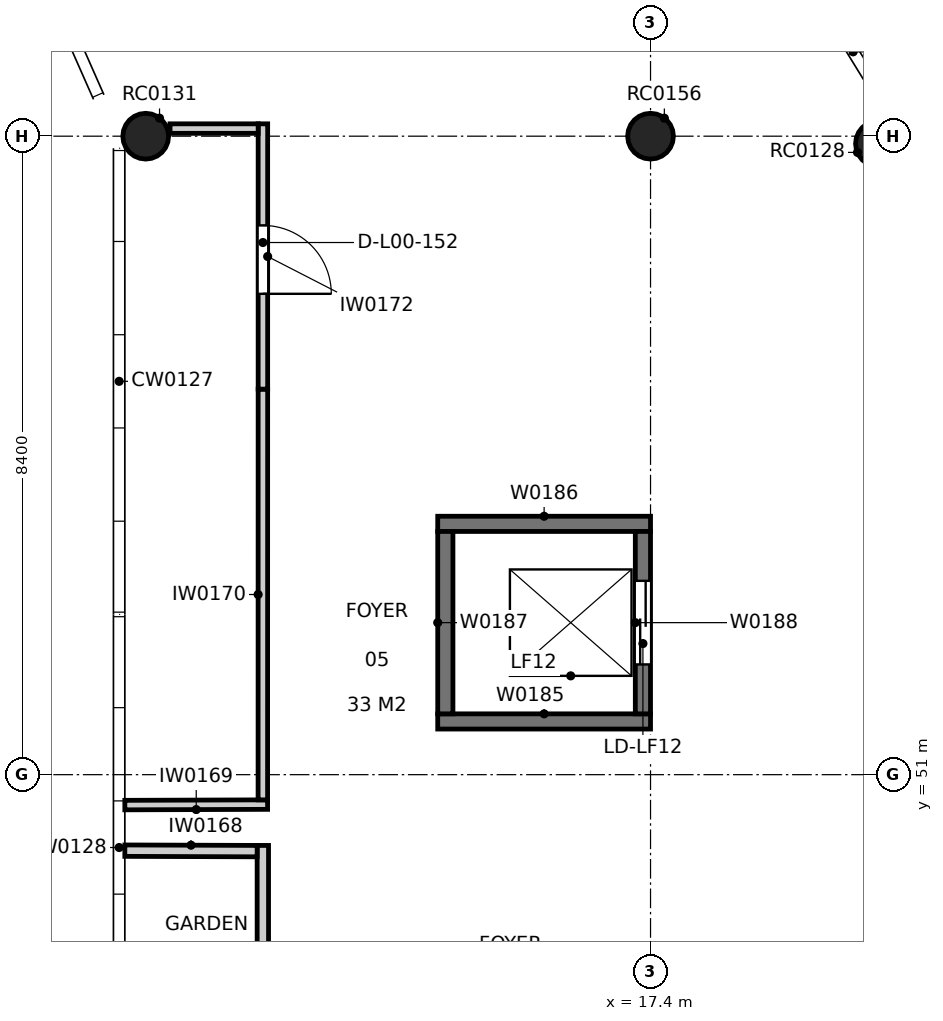
"""IFC4 building model, lengths in metres.
Left out: names, types, materials, properties, quantities, classifications, styles, units other than length and angle.
Written with IfcOpenShell. Run it as: python <this file> out.ifc"""

import sys

from ifc_helpers import new_model, si_unit, direction, frame, frame_2d, origin, origin_2d, place, context, subcontext, project, spatial, rectangle, circle, extrude, element, fill, save


model = new_model("IFC4")
c1 = context("Model", 3, precision=1e-05, world=origin(), true_north=direction((0.0, 1.0)))
c2 = subcontext(c1, "Body", "Model", "MODEL_VIEW")
j1 = project(units=[si_unit("LENGTHUNIT", "METRE"), si_unit("PLANEANGLEUNIT", "RADIAN")], contexts=[c1])
p1 = place(None, origin())
s1 = spatial("IfcSite", under=j1, at=p1, CompositionType="ELEMENT")
p2 = place(p1, origin())
s2 = spatial("IfcBuilding", under=s1, at=p2, CompositionType="ELEMENT")
p3 = place(p2, origin())
s3 = spatial("IfcBuildingStorey", under=s2, at=p3, CompositionType="ELEMENT", Elevation=0.0)
for number, where, z_axis, x_axis in (
    (1, (20.399, 59.301, -0.4), (0.0, 0.0, 1.0), (1.0, 0.0, 0.0)),
    (2, (10.758, 59.4, -0.4), (0.0, 0.0, 1.0), (1.0, 0.0, 0.0)),
    (3, (17.4, 59.4, -0.4), (0.0, 0.0, 1.0), (1.0, 0.0, 0.0)),
):
    element("IfcColumn", number, at=place(p3, frame(where, z_axis=z_axis, x_axis=x_axis)), inside=s3, PredefinedType="COLUMN", context=c2, shape_type="SweptSolid", body=[
        extrude(circle(Radius=0.3, at=origin_2d()), origin(), (0.0, 0.0, 1.0), 5.2),
    ])
for number, where, z_axis, x_axis in (
    (4, (14.6, 51.7, -1.4), (0.0, 0.0, 1.0), (1.0, 0.0, 0.0)),
    (5, (14.6, 54.3, -1.4), (0.0, 0.0, 1.0), (1.0, 0.0, 0.0)),
):
    element("IfcWall", number, at=place(p3, frame(where, z_axis=z_axis, x_axis=x_axis)), inside=s3, PredefinedType="SOLIDWALL", context=c2, shape_type="SweptSolid", body=[
        extrude(rectangle(XDim=2.8, YDim=0.2, at=frame_2d((1.4, 0.0))), origin(), (0.0, 0.0, 1.0), 6.2),
    ])
p4 = place(p3, frame((14.7, 51.8, -1.4), z_axis=(0.0, 0.0, 1.0), x_axis=(0.0, 1.0, 0.0)))
e6 = element("IfcWall", 6, at=p4, inside=s3, PredefinedType="SOLIDWALL", context=c2, shape_type="SweptSolid", body=[
    extrude(rectangle(XDim=2.4, YDim=0.2, at=frame_2d((1.2, 0.0))), origin(), (0.0, 0.0, 1.0), 6.2),
])
p5 = place(p3, frame((17.3, 51.8, -1.4), z_axis=(0.0, 0.0, 1.0), x_axis=(0.0, 1.0, 0.0)))
e7 = element("IfcWall", 7, at=p5, inside=s3, PredefinedType="SOLIDWALL", context=c2, shape_type="SweptSolid", body=[
    extrude(rectangle(XDim=2.4, YDim=0.2, at=frame_2d((1.2, 0.0))), origin(), (0.0, 0.0, 1.0), 6.2),
])
p6 = place(p5, frame((0.65, 0.0, 1.4)))
e8 = element("IfcOpeningElement", 8, at=p6, cuts=e7, PredefinedType="OPENING", context=c2, shape_type="SweptSolid", body=[
    extrude(rectangle(XDim=1.1, YDim=2.1, at=frame_2d((0.55, 1.05))), frame((0.0, 0.11, 0.0), z_axis=(0.0, -1.0, 0.0), x_axis=(1.0, 0.0, 0.0)), (0.0, 0.0, 1.0), 0.22),
])
p7 = place(p3, frame((12.3, 44.684, 0.0), z_axis=(0.0, 0.0, 1.0), x_axis=(-0.000181348322, 0.999999983556, 0.0)))
e9 = element("IfcWall", 9, at=p7, inside=s3, PredefinedType="PARTITIONING", context=c2, shape_type="SweptSolid", body=[
    extrude(rectangle(XDim=5.385, YDim=0.15, at=frame_2d((2.692, 0.0))), origin(), (0.0, 0.0, 1.0), 4.65),
])
p8 = place(p7, frame((1.235, 0.0, 0.0)))
e10 = element("IfcOpeningElement", 10, at=p8, cuts=e9, PredefinedType="OPENING", context=c2, shape_type="SweptSolid", body=[
    extrude(rectangle(XDim=1.0, YDim=2.1, at=frame_2d((0.5, 1.05))), frame((0.0, 0.085, 0.0), z_axis=(0.0, -1.0, 0.0), x_axis=(1.0, 0.0, 0.0)), (0.0, 0.0, 1.0), 0.17),
])
p9 = place(p3, frame((12.224, 49.994, 0.0), z_axis=(0.0, 0.0, 1.0), x_axis=(-0.999993852947, 0.003506289807, 0.0)))
e11 = element("IfcWall", 11, at=p9, inside=s3, PredefinedType="PARTITIONING", context=c2, shape_type="SweptSolid", body=[
    extrude(rectangle(XDim=1.741, YDim=0.15, at=frame_2d((0.87, 0.0))), origin(), (0.0, 0.0, 1.0), 3.75),
])
p10 = place(p3, frame((10.483, 50.6, 0.0), z_axis=(0.0, 0.0, 1.0), x_axis=(0.999994288877, 0.003379676526, 0.0)))
e12 = element("IfcWall", 12, at=p10, inside=s3, PredefinedType="PARTITIONING", context=c2, shape_type="SweptSolid", body=[
    extrude(rectangle(XDim=1.878, YDim=0.125, at=frame_2d((0.939, 0.0))), origin(), (0.0, 0.0, 1.0), 3.75),
])
p11 = place(p3, frame((12.299, 50.668, 0.0), z_axis=(0.0, 0.0, 1.0), x_axis=(0.00018072561, 0.999999983669, 0.0)))
e13 = element("IfcWall", 13, at=p11, inside=s3, PredefinedType="PARTITIONING", context=c2, shape_type="SweptSolid", body=[
    extrude(rectangle(XDim=5.404, YDim=0.125, at=frame_2d((2.702, 0.0))), origin(), (0.0, 0.0, 1.0), 3.75),
])
p12 = place(p3, frame((12.3, 59.562, 0.0), z_axis=(0.0, 0.0, 1.0), x_axis=(0.0, -1.0, 0.0)))
e14 = element("IfcWall", 14, at=p12, inside=s3, PredefinedType="PARTITIONING", context=c2, shape_type="SweptSolid", body=[
    extrude(rectangle(XDim=3.49, YDim=0.125, at=frame_2d((1.745, 0.0))), origin(), (0.0, 0.0, 1.0), 3.75),
])
p13 = place(p12, frame((1.336, 0.0, 0.0)))
e15 = element("IfcOpeningElement", 15, at=p13, cuts=e14, PredefinedType="OPENING", context=c2, shape_type="SweptSolid", body=[
    extrude(rectangle(XDim=0.9, YDim=2.1, at=frame_2d((0.45, 1.05))), frame((0.0, 0.073, 0.0), z_axis=(0.0, -1.0, 0.0), x_axis=(1.0, 0.0, 0.0)), (0.0, 0.0, 1.0), 0.145),
])
p14 = place(p3, frame((11.078, 59.5, 0.0), z_axis=(0.0, 0.0, 1.0), x_axis=(1.0, 0.0, 0.0)))
e16 = element("IfcWall", 16, at=p14, inside=s3, PredefinedType="PARTITIONING", context=c2, shape_type="SweptSolid", body=[
    extrude(rectangle(XDim=1.159, YDim=0.125, at=frame_2d((0.58, 0.0))), origin(), (0.0, 0.0, 1.0), 3.75),
])
p15 = place(p13, origin())
e17 = element("IfcDoor", 17, at=p15, inside=s3, OperationType="SINGLE_SWING_RIGHT", PredefinedType="DOOR", context=c2, shape_type="SweptSolid", body=[
    extrude(rectangle(XDim=0.9, YDim=2.1, at=frame_2d((0.45, 1.05))), frame((0.0, 0.025, 0.0), z_axis=(0.0, -1.0, 0.0), x_axis=(1.0, 0.0, 0.0)), (0.0, 0.0, 1.0), 0.05),
])
fill(e15, e17)
p16 = place(p6, origin())
e18 = element("IfcDoor", 18, at=p16, inside=s3, OperationType="SLIDING_TO_LEFT", PredefinedType="DOOR", context=c2, shape_type="SweptSolid", body=[
    extrude(rectangle(XDim=1.1, YDim=2.1, at=frame_2d((0.55, 1.05))), frame((0.0, 0.025, 0.0), z_axis=(0.0, -1.0, 0.0), x_axis=(1.0, 0.0, 0.0)), (0.0, 0.0, 1.0), 0.05),
])
fill(e8, e18)
save(model, sys.argv[1])
